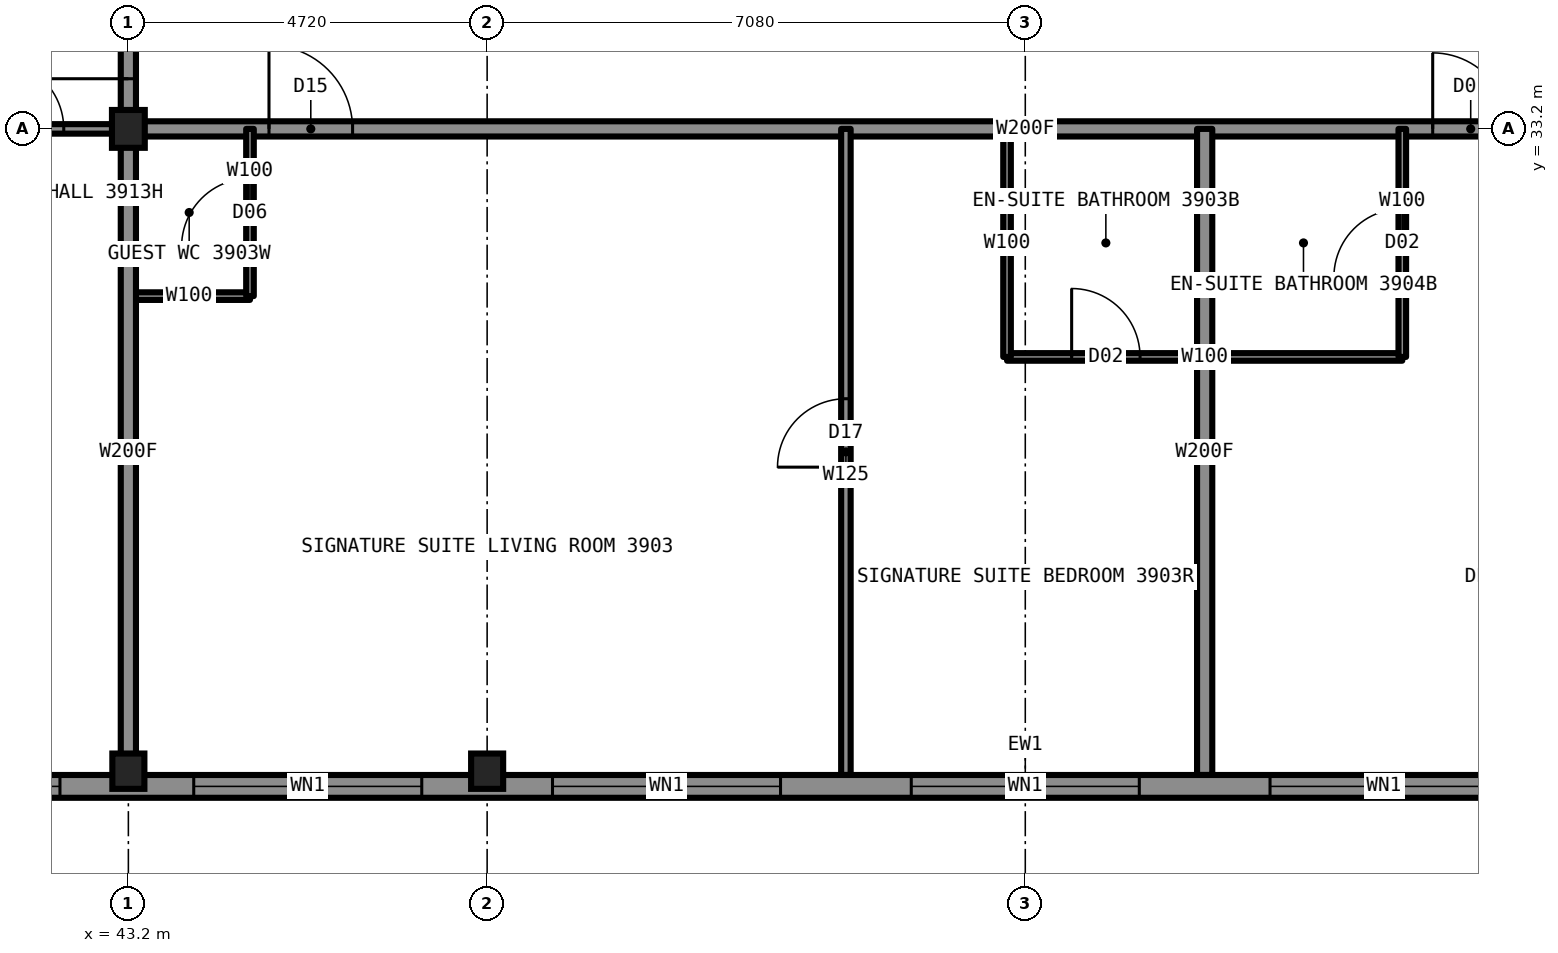
"""IFC4 building model, lengths in metres.
Left out: names, types, materials, properties, quantities, classifications, styles, units other than length and angle.
Written with IfcOpenShell. Run it as: python <this file> out.ifc"""

import sys

from ifc_helpers import new_model, si_unit, direction, frame, frame_2d, origin, origin_2d, place, context, subcontext, project, spatial, rectangle, i_section, extrude, element, fill, save


model = new_model("IFC4")
c1 = context("Model", 3, precision=1e-05, world=origin(), true_north=direction((0.0, 1.0)))
c2 = subcontext(c1, "Body", "Model", "MODEL_VIEW")
j1 = project(units=[si_unit("LENGTHUNIT", "METRE"), si_unit("PLANEANGLEUNIT", "RADIAN")], contexts=[c1])
p1 = place(None, origin())
s1 = spatial("IfcSite", under=j1, at=p1, CompositionType="ELEMENT")
p2 = place(p1, origin())
s2 = spatial("IfcBuilding", under=s1, at=p2, CompositionType="ELEMENT")
p3 = place(p2, frame((0.0, 0.0, 145.9)))
s3 = spatial("IfcBuildingStorey", under=s2, at=p3, CompositionType="ELEMENT", Elevation=145.9)
for number, where, z_axis, x_axis in (
    (1, (43.2, 24.75, 0.0), (0.0, 0.0, 1.0), (1.0, 0.0, 0.0)),
    (2, (47.92, 24.75, 0.0), (0.0, 0.0, 1.0), (1.0, 0.0, 0.0)),
):
    element("IfcColumn", number, at=place(p3, frame(where, z_axis=z_axis, x_axis=x_axis)), inside=s3, PredefinedType="COLUMN", context=c2, shape_type="SweptSolid", body=[
        extrude(i_section(OverallWidth=0.422, OverallDepth=0.465, WebThickness=0.045, FlangeThickness=0.073, at=origin_2d()), origin(), (0.0, 0.0, 1.0), 3.5),
    ])
p4 = place(p3, frame((43.2, 33.2, 0.0), z_axis=(0.0, 0.0, 1.0), x_axis=(1.0, 0.0, 0.0)))
e3 = element("IfcColumn", 3, at=p4, inside=s3, PredefinedType="COLUMN", context=c2, shape_type="SweptSolid", body=[
    extrude(i_section(OverallWidth=0.432, OverallDepth=0.498, WebThickness=0.056, FlangeThickness=0.089, at=origin_2d()), origin(), (0.0, 0.0, 1.0), 3.5),
])
p5 = place(p3, frame((43.2, 33.2, 0.0), z_axis=(0.0, 0.0, 1.0), x_axis=(1.0, 0.0, 0.0)))
e4 = element("IfcWall", 4, at=p5, inside=s3, PredefinedType="PARTITIONING", context=c2, shape_type="SweptSolid", body=[
    extrude(rectangle(XDim=23.6, YDim=0.2, at=frame_2d((11.8, 0.0))), origin(), (0.0, 0.0, 1.0), 3.33),
])
p6 = place(p5, frame((1.85, 0.0, 0.0)))
e5 = element("IfcOpeningElement", 5, at=p6, cuts=e4, PredefinedType="OPENING", context=c2, shape_type="SweptSolid", body=[
    extrude(rectangle(XDim=1.1, YDim=2.2, at=frame_2d((0.55, 1.1))), frame((0.0, 0.11, 0.0), z_axis=(0.0, -1.0, 0.0), x_axis=(1.0, 0.0, 0.0)), (0.0, 0.0, 1.0), 0.22),
])
p7 = place(p5, frame((17.16, 0.0, 0.0)))
e6 = element("IfcOpeningElement", 6, at=p7, cuts=e4, PredefinedType="OPENING", context=c2, shape_type="SweptSolid", body=[
    extrude(rectangle(XDim=1.0, YDim=2.2, at=frame_2d((0.5, 1.1))), frame((0.0, 0.11, 0.0), z_axis=(0.0, -1.0, 0.0), x_axis=(1.0, 0.0, 0.0)), (0.0, 0.0, 1.0), 0.22),
])
p8 = place(p3, frame((34.7, 33.2, 0.0), z_axis=(0.0, 0.0, 1.0), x_axis=(1.0, 0.0, 0.0)))
e7 = element("IfcWall", 7, at=p8, inside=s3, PredefinedType="PARTITIONING", context=c2, shape_type="SweptSolid", body=[
    extrude(rectangle(XDim=8.5, YDim=0.125, at=frame_2d((4.25, 0.0))), origin(), (0.0, 0.0, 1.0), 2.573),
])
p9 = place(p8, frame((6.75, 0.0, 0.0)))
e8 = element("IfcOpeningElement", 8, at=p9, cuts=e7, PredefinedType="OPENING", context=c2, shape_type="SweptSolid", body=[
    extrude(rectangle(XDim=0.9, YDim=2.2, at=frame_2d((0.45, 1.1))), frame((0.0, 0.073, 0.0), z_axis=(0.0, -1.0, 0.0), x_axis=(1.0, 0.0, 0.0)), (0.0, 0.0, 1.0), 0.145),
])
p10 = place(p3, frame((43.2, 31.0, 0.0), z_axis=(0.0, 0.0, 1.0), x_axis=(1.0, 0.0, 0.0)))
e9 = element("IfcWall", 9, at=p10, inside=s3, PredefinedType="PARTITIONING", context=c2, shape_type="SweptSolid", body=[
    extrude(rectangle(XDim=1.6, YDim=0.1, at=frame_2d((0.8, 0.0))), origin(), (0.0, 0.0, 1.0), 3.33),
])
p11 = place(p3, frame((54.76, 30.2, 0.0), z_axis=(0.0, 0.0, 1.0), x_axis=(1.0, 0.0, 0.0)))
e10 = element("IfcWall", 10, at=p11, inside=s3, PredefinedType="PARTITIONING", context=c2, shape_type="SweptSolid", body=[
    extrude(rectangle(XDim=5.2, YDim=0.1, at=frame_2d((2.6, 0.0))), origin(), (0.0, 0.0, 1.0), 3.33),
])
p12 = place(p11, frame((0.85, 0.0, 0.0)))
e11 = element("IfcOpeningElement", 11, at=p12, cuts=e10, PredefinedType="OPENING", context=c2, shape_type="SweptSolid", body=[
    extrude(rectangle(XDim=0.9, YDim=2.1, at=frame_2d((0.45, 1.05))), frame((0.0, 0.06, 0.0), z_axis=(0.0, -1.0, 0.0), x_axis=(1.0, 0.0, 0.0)), (0.0, 0.0, 1.0), 0.12),
])
p13 = place(p3, frame((54.76, 30.2, 0.0), z_axis=(0.0, 0.0, 1.0), x_axis=(0.0, 1.0, 0.0)))
e12 = element("IfcWall", 12, at=p13, inside=s3, PredefinedType="PARTITIONING", context=c2, shape_type="SweptSolid", body=[
    extrude(rectangle(XDim=3.0, YDim=0.1, at=frame_2d((1.5, 0.0))), origin(), (0.0, 0.0, 1.0), 3.33),
])
p14 = place(p3, frame((44.8, 31.0, 0.0), z_axis=(0.0, 0.0, 1.0), x_axis=(0.0, 1.0, 0.0)))
e13 = element("IfcWall", 13, at=p14, inside=s3, PredefinedType="PARTITIONING", context=c2, shape_type="SweptSolid", body=[
    extrude(rectangle(XDim=2.2, YDim=0.1, at=frame_2d((1.1, 0.0))), origin(), (0.0, 0.0, 1.0), 3.33),
])
p15 = place(p14, frame((0.65, 0.0, 0.0)))
e14 = element("IfcOpeningElement", 14, at=p15, cuts=e13, PredefinedType="OPENING", context=c2, shape_type="SweptSolid", body=[
    extrude(rectangle(XDim=0.9, YDim=2.1, at=frame_2d((0.45, 1.05))), frame((0.0, 0.06, 0.0), z_axis=(0.0, -1.0, 0.0), x_axis=(1.0, 0.0, 0.0)), (0.0, 0.0, 1.0), 0.12),
])
p16 = place(p3, frame((43.2, 33.2, 0.0), z_axis=(0.0, 0.0, 1.0), x_axis=(0.0, 1.0, 0.0)))
e15 = element("IfcWall", 15, at=p16, inside=s3, PredefinedType="PARTITIONING", context=c2, shape_type="SweptSolid", body=[
    extrude(rectangle(XDim=4.72, YDim=0.2, at=frame_2d((2.36, 0.0))), origin(), (0.0, 0.0, 1.0), 3.33),
])
p17 = place(p16, frame((0.66, 0.0, 0.0)))
e16 = element("IfcOpeningElement", 16, at=p17, cuts=e15, PredefinedType="OPENING", context=c2, shape_type="SweptSolid", body=[
    extrude(rectangle(XDim=1.1, YDim=2.2, at=frame_2d((0.55, 1.1))), frame((0.0, 0.11, 0.0), z_axis=(0.0, -1.0, 0.0), x_axis=(1.0, 0.0, 0.0)), (0.0, 0.0, 1.0), 0.22),
])
p18 = place(p3, frame((43.2, 24.7, 0.0), z_axis=(0.0, 0.0, 1.0), x_axis=(0.0, 1.0, 0.0)))
e17 = element("IfcWall", 17, at=p18, inside=s3, PredefinedType="PARTITIONING", context=c2, shape_type="SweptSolid", body=[
    extrude(rectangle(XDim=8.5, YDim=0.2, at=frame_2d((4.25, 0.0))), origin(), (0.0, 0.0, 1.0), 2.573),
])
p19 = place(p3, frame((52.64, 24.7, 0.0), z_axis=(0.0, 0.0, 1.0), x_axis=(0.0, 1.0, 0.0)))
e18 = element("IfcWall", 18, at=p19, inside=s3, PredefinedType="PARTITIONING", context=c2, shape_type="SweptSolid", body=[
    extrude(rectangle(XDim=8.5, YDim=0.125, at=frame_2d((4.25, 0.0))), origin(), (0.0, 0.0, 1.0), 3.33),
])
p20 = place(p19, frame((4.05, 0.0, 0.0)))
e19 = element("IfcOpeningElement", 19, at=p20, cuts=e18, PredefinedType="OPENING", context=c2, shape_type="SweptSolid", body=[
    extrude(rectangle(XDim=0.9, YDim=2.2, at=frame_2d((0.45, 1.1))), frame((0.0, 0.073, 0.0), z_axis=(0.0, -1.0, 0.0), x_axis=(1.0, 0.0, 0.0)), (0.0, 0.0, 1.0), 0.145),
])
p21 = place(p3, frame((57.36, 24.7, 0.0), z_axis=(0.0, 0.0, 1.0), x_axis=(0.0, 1.0, 0.0)))
e20 = element("IfcWall", 20, at=p21, inside=s3, PredefinedType="PARTITIONING", context=c2, shape_type="SweptSolid", body=[
    extrude(rectangle(XDim=8.5, YDim=0.2, at=frame_2d((4.25, 0.0))), origin(), (0.0, 0.0, 1.0), 3.33),
])
p22 = place(p3, frame((59.96, 30.2, 0.0), z_axis=(0.0, 0.0, 1.0), x_axis=(0.0, 1.0, 0.0)))
e21 = element("IfcWall", 21, at=p22, inside=s3, PredefinedType="PARTITIONING", context=c2, shape_type="SweptSolid", body=[
    extrude(rectangle(XDim=3.0, YDim=0.1, at=frame_2d((1.5, 0.0))), origin(), (0.0, 0.0, 1.0), 3.33),
])
p23 = place(p22, frame((1.05, 0.0, 0.0)))
e22 = element("IfcOpeningElement", 22, at=p23, cuts=e21, PredefinedType="OPENING", context=c2, shape_type="SweptSolid", body=[
    extrude(rectangle(XDim=0.9, YDim=2.1, at=frame_2d((0.45, 1.05))), frame((0.0, 0.06, 0.0), z_axis=(0.0, -1.0, 0.0), x_axis=(1.0, 0.0, 0.0)), (0.0, 0.0, 1.0), 0.12),
])
p24 = place(p3, frame((39.9, 24.55, 0.0), z_axis=(0.0, 0.0, 1.0), x_axis=(1.0, 0.0, 0.0)))
e23 = element("IfcWall", 23, at=p24, inside=s3, PredefinedType="SOLIDWALL", context=c2, shape_type="SweptSolid", body=[
    extrude(rectangle(XDim=30.2, YDim=0.3, at=frame_2d((15.1, 0.0))), origin(), (0.0, 0.0, 1.0), 2.83),
])
p25 = place(p24, frame((1.3, 0.0, 0.8)))
e24 = element("IfcOpeningElement", 24, at=p25, cuts=e23, PredefinedType="OPENING", context=c2, shape_type="SweptSolid", body=[
    extrude(rectangle(XDim=1.1, YDim=1.7, at=frame_2d((0.55, 0.85))), frame((0.0, 0.16, 0.0), z_axis=(0.0, -1.0, 0.0), x_axis=(1.0, 0.0, 0.0)), (0.0, 0.0, 1.0), 0.32),
])
p26 = place(p24, frame((4.16, 0.0, 0.5)))
e25 = element("IfcOpeningElement", 25, at=p26, cuts=e23, PredefinedType="OPENING", context=c2, shape_type="SweptSolid", body=[
    extrude(rectangle(XDim=3.0, YDim=2.0, at=frame_2d((1.5, 1.0))), frame((0.0, 0.16, 0.0), z_axis=(0.0, -1.0, 0.0), x_axis=(1.0, 0.0, 0.0)), (0.0, 0.0, 1.0), 0.32),
])
p27 = place(p24, frame((8.88, 0.0, 0.5)))
e26 = element("IfcOpeningElement", 26, at=p27, cuts=e23, PredefinedType="OPENING", context=c2, shape_type="SweptSolid", body=[
    extrude(rectangle(XDim=3.0, YDim=2.0, at=frame_2d((1.5, 1.0))), frame((0.0, 0.16, 0.0), z_axis=(0.0, -1.0, 0.0), x_axis=(1.0, 0.0, 0.0)), (0.0, 0.0, 1.0), 0.32),
])
p28 = place(p24, frame((13.6, 0.0, 0.5)))
e27 = element("IfcOpeningElement", 27, at=p28, cuts=e23, PredefinedType="OPENING", context=c2, shape_type="SweptSolid", body=[
    extrude(rectangle(XDim=3.0, YDim=2.0, at=frame_2d((1.5, 1.0))), frame((0.0, 0.16, 0.0), z_axis=(0.0, -1.0, 0.0), x_axis=(1.0, 0.0, 0.0)), (0.0, 0.0, 1.0), 0.32),
])
p29 = place(p24, frame((18.32, 0.0, 0.5)))
e28 = element("IfcOpeningElement", 28, at=p29, cuts=e23, PredefinedType="OPENING", context=c2, shape_type="SweptSolid", body=[
    extrude(rectangle(XDim=3.0, YDim=2.0, at=frame_2d((1.5, 1.0))), frame((0.0, 0.16, 0.0), z_axis=(0.0, -1.0, 0.0), x_axis=(1.0, 0.0, 0.0)), (0.0, 0.0, 1.0), 0.32),
])
p30 = place(p24, frame((23.04, 0.0, 0.5)))
e29 = element("IfcOpeningElement", 29, at=p30, cuts=e23, PredefinedType="OPENING", context=c2, shape_type="SweptSolid", body=[
    extrude(rectangle(XDim=3.0, YDim=2.0, at=frame_2d((1.5, 1.0))), frame((0.0, 0.16, 0.0), z_axis=(0.0, -1.0, 0.0), x_axis=(1.0, 0.0, 0.0)), (0.0, 0.0, 1.0), 0.32),
])
p31 = place(p24, frame((27.75, 0.0, 0.8)))
e30 = element("IfcOpeningElement", 30, at=p31, cuts=e23, PredefinedType="OPENING", context=c2, shape_type="SweptSolid", body=[
    extrude(rectangle(XDim=1.1, YDim=1.7, at=frame_2d((0.55, 0.85))), frame((0.0, 0.16, 0.0), z_axis=(0.0, -1.0, 0.0), x_axis=(1.0, 0.0, 0.0)), (0.0, 0.0, 1.0), 0.32),
])
p32 = place(p6, origin())
e31 = element("IfcDoor", 31, at=p32, inside=s3, OperationType="SINGLE_SWING_LEFT", PredefinedType="DOOR", context=c2, shape_type="SweptSolid", body=[
    extrude(rectangle(XDim=1.1, YDim=2.2, at=frame_2d((0.55, 1.1))), frame((0.0, 0.025, 0.0), z_axis=(0.0, -1.0, 0.0), x_axis=(1.0, 0.0, 0.0)), (0.0, 0.0, 1.0), 0.05),
])
fill(e5, e31)
p33 = place(p12, origin())
e32 = element("IfcDoor", 32, at=p33, inside=s3, OperationType="SINGLE_SWING_RIGHT", PredefinedType="DOOR", context=c2, shape_type="SweptSolid", body=[
    extrude(rectangle(XDim=0.9, YDim=2.1, at=frame_2d((0.45, 1.05))), frame((0.0, 0.025, 0.0), z_axis=(0.0, -1.0, 0.0), x_axis=(1.0, 0.0, 0.0)), (0.0, 0.0, 1.0), 0.05),
])
fill(e11, e32)
p34 = place(p20, origin())
e33 = element("IfcDoor", 33, at=p34, inside=s3, OperationType="SINGLE_SWING_LEFT", PredefinedType="DOOR", context=c2, shape_type="SweptSolid", body=[
    extrude(rectangle(XDim=0.9, YDim=2.2, at=frame_2d((0.45, 1.1))), frame((0.0, 0.025, 0.0), z_axis=(0.0, -1.0, 0.0), x_axis=(1.0, 0.0, 0.0)), (0.0, 0.0, 1.0), 0.05),
])
fill(e19, e33)
p35 = place(p15, origin())
e34 = element("IfcDoor", 34, at=p35, inside=s3, OperationType="SINGLE_SWING_LEFT", PredefinedType="DOOR", context=c2, shape_type="SweptSolid", body=[
    extrude(rectangle(XDim=0.9, YDim=2.1, at=frame_2d((0.45, 1.05))), frame((0.0, 0.025, 0.0), z_axis=(0.0, -1.0, 0.0), x_axis=(1.0, 0.0, 0.0)), (0.0, 0.0, 1.0), 0.05),
])
fill(e14, e34)
p36 = place(p7, origin())
e35 = element("IfcDoor", 35, at=p36, inside=s3, OperationType="SINGLE_SWING_LEFT", PredefinedType="DOOR", context=c2, shape_type="SweptSolid", body=[
    extrude(rectangle(XDim=1.0, YDim=2.2, at=frame_2d((0.5, 1.1))), frame((0.0, 0.025, 0.0), z_axis=(0.0, -1.0, 0.0), x_axis=(1.0, 0.0, 0.0)), (0.0, 0.0, 1.0), 0.05),
])
fill(e6, e35)
p37 = place(p23, origin())
e36 = element("IfcDoor", 36, at=p37, inside=s3, OperationType="SINGLE_SWING_RIGHT", PredefinedType="DOOR", context=c2, shape_type="SweptSolid", body=[
    extrude(rectangle(XDim=0.9, YDim=2.1, at=frame_2d((0.45, 1.05))), frame((0.0, 0.025, 0.0), z_axis=(0.0, -1.0, 0.0), x_axis=(1.0, 0.0, 0.0)), (0.0, 0.0, 1.0), 0.05),
])
fill(e22, e36)
p38 = place(p9, origin())
e37 = element("IfcDoor", 37, at=p38, inside=s3, OperationType="SINGLE_SWING_LEFT", PredefinedType="DOOR", context=c2, shape_type="SweptSolid", body=[
    extrude(rectangle(XDim=0.9, YDim=2.2, at=frame_2d((0.45, 1.1))), frame((0.0, 0.025, 0.0), z_axis=(0.0, -1.0, 0.0), x_axis=(1.0, 0.0, 0.0)), (0.0, 0.0, 1.0), 0.05),
])
fill(e8, e37)
p39 = place(p17, origin())
e38 = element("IfcDoor", 38, at=p39, inside=s3, OperationType="SINGLE_SWING_LEFT", PredefinedType="DOOR", context=c2, shape_type="SweptSolid", body=[
    extrude(rectangle(XDim=1.1, YDim=2.2, at=frame_2d((0.55, 1.1))), frame((0.0, 0.025, 0.0), z_axis=(0.0, -1.0, 0.0), x_axis=(1.0, 0.0, 0.0)), (0.0, 0.0, 1.0), 0.05),
])
fill(e16, e38)
p40 = place(p25, origin())
e39 = element("IfcWindow", 39, at=p40, inside=s3, PartitioningType="SINGLE_PANEL", PredefinedType="WINDOW", context=c2, shape_type="SweptSolid", body=[
    extrude(rectangle(XDim=1.1, YDim=1.7, at=frame_2d((0.55, 0.85))), frame((0.0, 0.03, 0.0), z_axis=(0.0, -1.0, 0.0), x_axis=(1.0, 0.0, 0.0)), (0.0, 0.0, 1.0), 0.06),
])
fill(e24, e39)
p41 = place(p26, origin())
e40 = element("IfcWindow", 40, at=p41, inside=s3, PartitioningType="SINGLE_PANEL", PredefinedType="WINDOW", context=c2, shape_type="SweptSolid", body=[
    extrude(rectangle(XDim=3.0, YDim=2.0, at=frame_2d((1.5, 1.0))), frame((0.0, 0.03, 0.0), z_axis=(0.0, -1.0, 0.0), x_axis=(1.0, 0.0, 0.0)), (0.0, 0.0, 1.0), 0.06),
])
fill(e25, e40)
p42 = place(p27, origin())
e41 = element("IfcWindow", 41, at=p42, inside=s3, PartitioningType="SINGLE_PANEL", PredefinedType="WINDOW", context=c2, shape_type="SweptSolid", body=[
    extrude(rectangle(XDim=3.0, YDim=2.0, at=frame_2d((1.5, 1.0))), frame((0.0, 0.03, 0.0), z_axis=(0.0, -1.0, 0.0), x_axis=(1.0, 0.0, 0.0)), (0.0, 0.0, 1.0), 0.06),
])
fill(e26, e41)
p43 = place(p28, origin())
e42 = element("IfcWindow", 42, at=p43, inside=s3, PartitioningType="SINGLE_PANEL", PredefinedType="WINDOW", context=c2, shape_type="SweptSolid", body=[
    extrude(rectangle(XDim=3.0, YDim=2.0, at=frame_2d((1.5, 1.0))), frame((0.0, 0.03, 0.0), z_axis=(0.0, -1.0, 0.0), x_axis=(1.0, 0.0, 0.0)), (0.0, 0.0, 1.0), 0.06),
])
fill(e27, e42)
p44 = place(p29, origin())
e43 = element("IfcWindow", 43, at=p44, inside=s3, PartitioningType="SINGLE_PANEL", PredefinedType="WINDOW", context=c2, shape_type="SweptSolid", body=[
    extrude(rectangle(XDim=3.0, YDim=2.0, at=frame_2d((1.5, 1.0))), frame((0.0, 0.03, 0.0), z_axis=(0.0, -1.0, 0.0), x_axis=(1.0, 0.0, 0.0)), (0.0, 0.0, 1.0), 0.06),
])
fill(e28, e43)
save(model, sys.argv[1])
